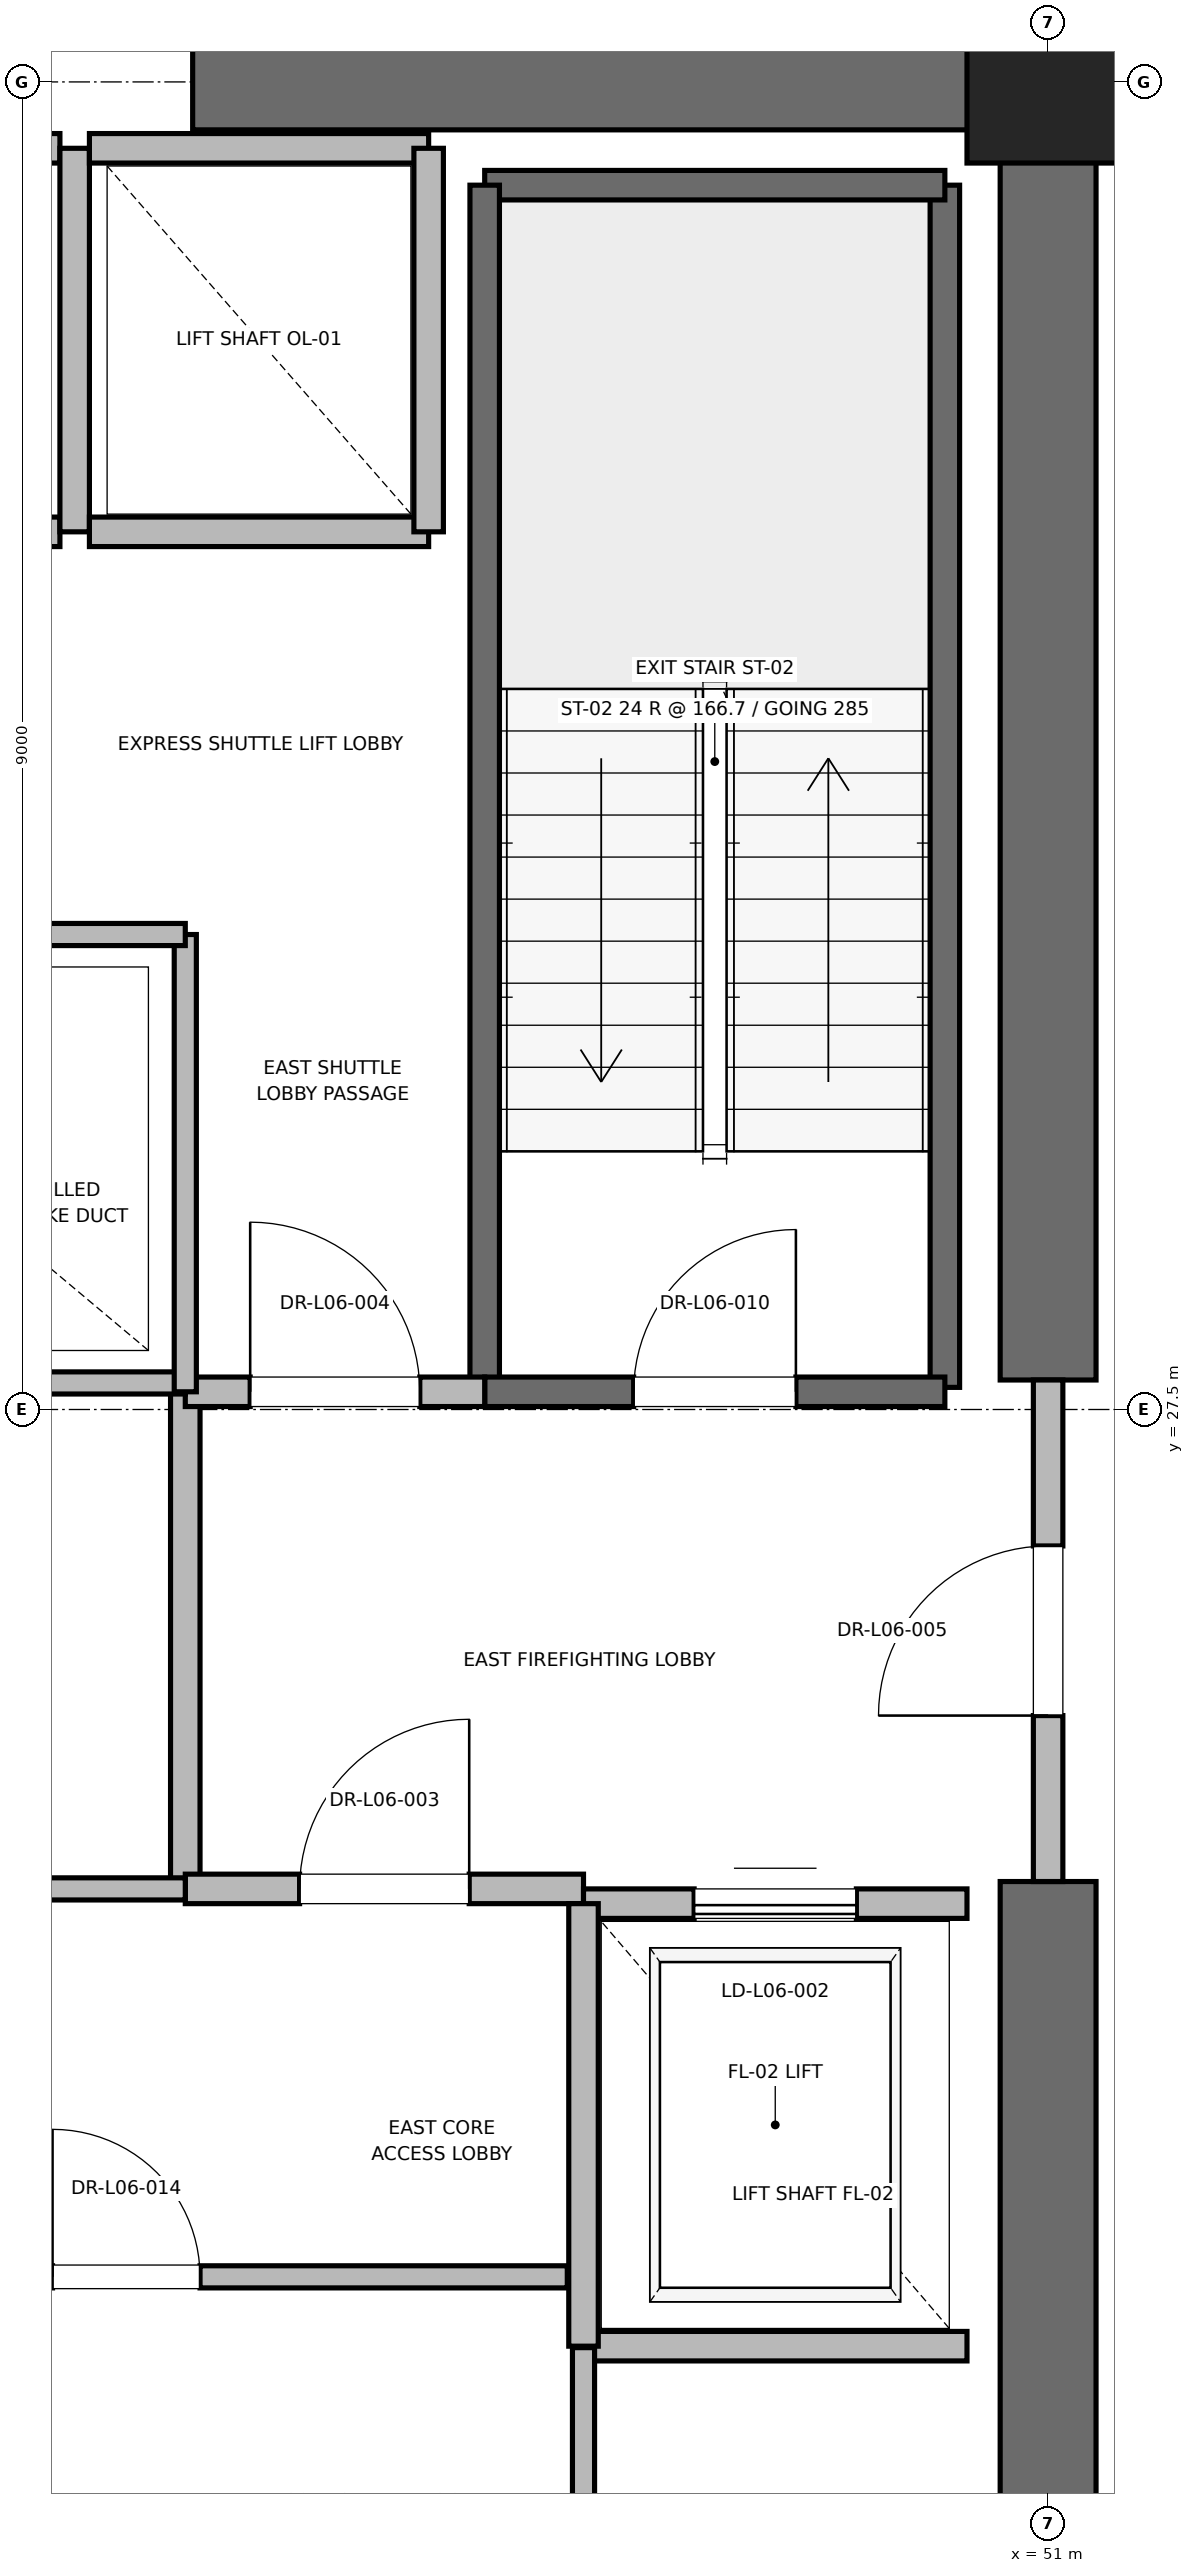
"""IFC4 building model, lengths in metres.
Left out: names, types, materials, properties, quantities, classifications, styles, units other than length and angle.
Written with IfcOpenShell. Run it as: python <this file> out.ifc"""

import sys

from ifc_helpers import new_model, si_unit, direction, frame, frame_2d, origin, origin_2d, place, context, subcontext, project, spatial, rectangle, extrude, element, fill, save


model = new_model("IFC4")
c1 = context("Model", 3, precision=1e-05, world=origin(), true_north=direction((0.0, 1.0)))
c2 = subcontext(c1, "Body", "Model", "MODEL_VIEW")
j1 = project(units=[si_unit("LENGTHUNIT", "METRE"), si_unit("PLANEANGLEUNIT", "RADIAN")], contexts=[c1])
p1 = place(None, origin())
s1 = spatial("IfcSite", under=j1, at=p1, CompositionType="ELEMENT")
p2 = place(p1, origin())
s2 = spatial("IfcBuilding", under=s1, at=p2, CompositionType="ELEMENT")
p3 = place(p2, frame((0.0, 0.0, 31.6)))
s3 = spatial("IfcBuildingStorey", under=s2, at=p3, CompositionType="ELEMENT", Elevation=31.6)
p4 = place(p3, frame((51.0, 36.5, 0.0), z_axis=(0.0, 0.0, 1.0), x_axis=(1.0, 0.0, 0.0)))
e1 = element("IfcColumn", 1, at=p4, inside=s3, PredefinedType="PILASTER", context=c2, shape_type="SweptSolid", body=[
    extrude(rectangle(XDim=1.1, YDim=1.1, at=origin_2d()), origin(), (0.0, 0.0, 1.0), 4.0),
])
for number, where, z_axis, x_axis in (
    (2, (45.2, 36.5, 0.0), (0.0, 0.0, 1.0), (1.0, 0.0, 0.0)),
    (3, (51.0, 18.5, 0.0), (0.0, 0.0, 1.0), (0.0, 1.0, 0.0)),
):
    element("IfcWall", number, at=place(p3, frame(where, z_axis=z_axis, x_axis=x_axis)), inside=s3, PredefinedType="SHEAR", context=c2, shape_type="SweptSolid", body=[
        extrude(rectangle(XDim=5.8, YDim=0.65, at=frame_2d((2.9, 0.0))), origin(), (0.0, 0.0, 1.0), 3.76),
    ])
p5 = place(p3, frame((51.0, 27.7, 0.0), z_axis=(0.0, 0.0, 1.0), x_axis=(0.0, 1.0, 0.0)))
e4 = element("IfcWall", 4, at=p5, inside=s3, PredefinedType="SHEAR", context=c2, shape_type="SweptSolid", body=[
    extrude(rectangle(XDim=8.8, YDim=0.65, at=frame_2d((4.4, 0.0))), origin(), (0.0, 0.0, 1.0), 3.76),
])
p6 = place(p3, frame((50.3, 27.65, 0.0), z_axis=(0.0, 0.0, 1.0), x_axis=(0.0, 1.0, 0.0)))
e5 = element("IfcWall", 5, at=p6, inside=s3, PredefinedType="SOLIDWALL", context=c2, shape_type="SweptSolid", body=[
    extrude(rectangle(XDim=8.15, YDim=0.2, at=frame_2d((4.075, 0.0))), origin(), (0.0, 0.0, 1.0), 3.76),
])
p7 = place(p3, frame((47.18, 35.8, 0.0), z_axis=(0.0, 0.0, 1.0), x_axis=(1.0, 0.0, 0.0)))
e6 = element("IfcWall", 6, at=p7, inside=s3, PredefinedType="SOLIDWALL", context=c2, shape_type="SweptSolid", body=[
    extrude(rectangle(XDim=3.12, YDim=0.2, at=frame_2d((1.56, 0.0))), origin(), (0.0, 0.0, 1.0), 3.76),
])
p8 = place(p3, frame((47.18, 27.62, 0.0), z_axis=(0.0, 0.0, 1.0), x_axis=(0.0, 1.0, 0.0)))
e7 = element("IfcWall", 7, at=p8, inside=s3, PredefinedType="SOLIDWALL", context=c2, shape_type="SweptSolid", body=[
    extrude(rectangle(XDim=8.18, YDim=0.2, at=frame_2d((4.09, 0.0))), origin(), (0.0, 0.0, 1.0), 3.76),
])
p9 = place(p3, frame((47.18, 27.62, 0.0), z_axis=(0.0, 0.0, 1.0), x_axis=(1.0, 0.0, 0.0)))
e8 = element("IfcWall", 8, at=p9, inside=s3, PredefinedType="SOLIDWALL", context=c2, shape_type="SweptSolid", body=[
    extrude(rectangle(XDim=3.12, YDim=0.2, at=frame_2d((1.56, 0.0))), origin(), (0.0, 0.0, 1.0), 3.76),
])
p10 = place(p9, frame((1.01, 0.0, 0.0)))
e9 = element("IfcOpeningElement", 9, at=p10, cuts=e8, PredefinedType="OPENING", context=c2, shape_type="SweptSolid", body=[
    extrude(rectangle(XDim=1.1, YDim=2.15, at=frame_2d((0.55, 1.075))), frame((0.0, 0.1, 0.0), z_axis=(0.0, -1.0, 0.0), x_axis=(1.0, 0.0, 0.0)), (0.0, 0.0, 1.0), 0.2),
])
p11 = place(p3, frame((45.15, 24.25, 0.0), z_axis=(0.0, 0.0, 1.0), x_axis=(0.0, 1.0, 0.0)))
e10 = element("IfcWall", 10, at=p11, inside=s3, PredefinedType="PARTITIONING", context=c2, shape_type="SweptSolid", body=[
    extrude(rectangle(XDim=3.37, YDim=0.2, at=frame_2d((1.685, 0.0))), origin(), (0.0, 0.0, 1.0), 3.76),
])
p12 = place(p3, frame((45.15, 24.25, 0.0), z_axis=(0.0, 0.0, 1.0), x_axis=(1.0, 0.0, 0.0)))
e11 = element("IfcWall", 11, at=p12, inside=s3, PredefinedType="PARTITIONING", context=c2, shape_type="SweptSolid", body=[
    extrude(rectangle(XDim=2.7, YDim=0.2, at=frame_2d((1.35, 0.0))), origin(), (0.0, 0.0, 1.0), 3.76),
])
p13 = place(p12, frame((0.775, 0.0, 0.0)))
e12 = element("IfcOpeningElement", 12, at=p13, cuts=e11, PredefinedType="OPENING", context=c2, shape_type="SweptSolid", body=[
    extrude(rectangle(XDim=1.15, YDim=2.2, at=frame_2d((0.575, 1.1))), frame((0.0, 0.1, 0.0), z_axis=(0.0, -1.0, 0.0), x_axis=(1.0, 0.0, 0.0)), (0.0, 0.0, 1.0), 0.2),
])
p14 = place(p3, frame((45.15, 27.62, 0.0), z_axis=(0.0, 0.0, 1.0), x_axis=(1.0, 0.0, 0.0)))
e13 = element("IfcWall", 13, at=p14, inside=s3, PredefinedType="PARTITIONING", context=c2, shape_type="SweptSolid", body=[
    extrude(rectangle(XDim=2.03, YDim=0.2, at=frame_2d((1.015, 0.0))), origin(), (0.0, 0.0, 1.0), 3.76),
])
p15 = place(p14, frame((0.44, 0.0, 0.0)))
e14 = element("IfcOpeningElement", 14, at=p15, cuts=e13, PredefinedType="OPENING", context=c2, shape_type="SweptSolid", body=[
    extrude(rectangle(XDim=1.15, YDim=2.2, at=frame_2d((0.575, 1.1))), frame((0.0, 0.1, 0.0), z_axis=(0.0, -1.0, 0.0), x_axis=(1.0, 0.0, 0.0)), (0.0, 0.0, 1.0), 0.2),
])
p16 = place(p3, frame((51.0, 24.3, 0.0), z_axis=(0.0, 0.0, 1.0), x_axis=(0.0, 1.0, 0.0)))
e15 = element("IfcWall", 15, at=p16, inside=s3, PredefinedType="PARTITIONING", context=c2, shape_type="SweptSolid", body=[
    extrude(rectangle(XDim=3.4, YDim=0.2, at=frame_2d((1.7, 0.0))), origin(), (0.0, 0.0, 1.0), 2.54),
])
p17 = place(p16, frame((1.125, 0.0, 0.0)))
e16 = element("IfcOpeningElement", 16, at=p17, cuts=e15, PredefinedType="OPENING", context=c2, shape_type="SweptSolid", body=[
    extrude(rectangle(XDim=1.15, YDim=2.2, at=frame_2d((0.575, 1.1))), frame((0.0, 0.1, 0.0), z_axis=(0.0, -1.0, 0.0), x_axis=(1.0, 0.0, 0.0)), (0.0, 0.0, 1.0), 0.2),
])
p18 = place(p3, frame((47.85, 21.15, 0.0), z_axis=(0.0, 0.0, 1.0), x_axis=(1.0, 0.0, 0.0)))
e17 = element("IfcWall", 17, at=p18, inside=s3, PredefinedType="SOLIDWALL", context=c2, shape_type="SweptSolid", body=[
    extrude(rectangle(XDim=2.6, YDim=0.2, at=frame_2d((1.3, 0.0))), origin(), (0.0, 0.0, 1.0), 3.76),
])
p19 = place(p3, frame((50.45, 24.15, 0.0), z_axis=(0.0, 0.0, 1.0), x_axis=(-1.0, 0.0, 0.0)))
e18 = element("IfcWall", 18, at=p19, inside=s3, PredefinedType="SOLIDWALL", context=c2, shape_type="SweptSolid", body=[
    extrude(rectangle(XDim=2.6, YDim=0.2, at=frame_2d((1.3, 0.0))), origin(), (0.0, 0.0, 1.0), 2.54),
])
p20 = place(p19, frame((0.75, 0.0, 0.0)))
e19 = element("IfcOpeningElement", 19, at=p20, cuts=e18, PredefinedType="OPENING", context=c2, shape_type="SweptSolid", body=[
    extrude(rectangle(XDim=1.1, YDim=2.2, at=frame_2d((0.55, 1.1))), frame((0.0, 0.1, 0.0), z_axis=(0.0, -1.0, 0.0), x_axis=(1.0, 0.0, 0.0)), (0.0, 0.0, 1.0), 0.2),
])
p21 = place(p3, frame((47.85, 24.15, 0.0), z_axis=(0.0, 0.0, 1.0), x_axis=(0.0, -1.0, 0.0)))
e20 = element("IfcWall", 20, at=p21, inside=s3, PredefinedType="SOLIDWALL", context=c2, shape_type="SweptSolid", body=[
    extrude(rectangle(XDim=3.0, YDim=0.2, at=frame_2d((1.5, 0.0))), origin(), (0.0, 0.0, 1.0), 3.76),
])
p22 = place(p3, frame((42.0, 33.45, 0.0), z_axis=(0.0, 0.0, 1.0), x_axis=(1.0, 0.0, 0.0)))
e21 = element("IfcWall", 21, at=p22, inside=s3, PredefinedType="SOLIDWALL", context=c2, shape_type="SweptSolid", body=[
    extrude(rectangle(XDim=2.3, YDim=0.2, at=frame_2d((1.15, 0.0))), origin(), (0.0, 0.0, 1.0), 3.76),
])
p23 = place(p3, frame((44.3, 36.05, 0.0), z_axis=(0.0, 0.0, 1.0), x_axis=(-1.0, 0.0, 0.0)))
e22 = element("IfcWall", 22, at=p23, inside=s3, PredefinedType="SOLIDWALL", context=c2, shape_type="SweptSolid", body=[
    extrude(rectangle(XDim=2.3, YDim=0.2, at=frame_2d((1.15, 0.0))), origin(), (0.0, 0.0, 1.0), 2.54),
])
p24 = place(p3, frame((44.4, 33.45, 0.0), z_axis=(0.0, 0.0, 1.0), x_axis=(0.0, 1.0, 0.0)))
e23 = element("IfcWall", 23, at=p24, inside=s3, PredefinedType="SOLIDWALL", context=c2, shape_type="SweptSolid", body=[
    extrude(rectangle(XDim=2.6, YDim=0.2, at=frame_2d((1.3, 0.0))), origin(), (0.0, 0.0, 1.0), 2.54),
])
p25 = place(p3, frame((44.5, 33.45, 0.0), z_axis=(0.0, 0.0, 1.0), x_axis=(1.0, 0.0, 0.0)))
e24 = element("IfcWall", 24, at=p25, inside=s3, PredefinedType="SOLIDWALL", context=c2, shape_type="SweptSolid", body=[
    extrude(rectangle(XDim=2.3, YDim=0.2, at=frame_2d((1.15, 0.0))), origin(), (0.0, 0.0, 1.0), 3.76),
])
p26 = place(p3, frame((46.8, 36.05, 0.0), z_axis=(0.0, 0.0, 1.0), x_axis=(-1.0, 0.0, 0.0)))
e25 = element("IfcWall", 25, at=p26, inside=s3, PredefinedType="SOLIDWALL", context=c2, shape_type="SweptSolid", body=[
    extrude(rectangle(XDim=2.3, YDim=0.2, at=frame_2d((1.15, 0.0))), origin(), (0.0, 0.0, 1.0), 2.54),
])
p27 = place(p3, frame((46.8, 33.45, 0.0), z_axis=(0.0, 0.0, 1.0), x_axis=(0.0, 1.0, 0.0)))
e26 = element("IfcWall", 26, at=p27, inside=s3, PredefinedType="SOLIDWALL", context=c2, shape_type="SweptSolid", body=[
    extrude(rectangle(XDim=2.6, YDim=0.2, at=frame_2d((1.3, 0.0))), origin(), (0.0, 0.0, 1.0), 3.76),
])
p28 = place(p3, frame((41.56, 27.68, 0.0), z_axis=(0.0, 0.0, 1.0), x_axis=(1.0, 0.0, 0.0)))
e27 = element("IfcWall", 27, at=p28, inside=s3, PredefinedType="PARTITIONING", context=c2, shape_type="SweptSolid", body=[
    extrude(rectangle(XDim=3.59, YDim=0.15, at=frame_2d((1.795, 0.0))), origin(), (0.0, 0.0, 1.0), 2.85),
])
p29 = place(p3, frame((47.85, 18.6, 0.0), z_axis=(0.0, 0.0, 1.0), x_axis=(0.0, 1.0, 0.0)))
e28 = element("IfcWall", 28, at=p29, inside=s3, PredefinedType="PARTITIONING", context=c2, shape_type="SweptSolid", body=[
    extrude(rectangle(XDim=2.54, YDim=0.15, at=frame_2d((1.27, 0.0))), origin(), (0.0, 0.0, 1.0), 2.85),
])
p30 = place(p3, frame((41.76, 21.62, 0.0), z_axis=(0.0, 0.0, 1.0), x_axis=(1.0, 0.0, 0.0)))
e29 = element("IfcWall", 29, at=p30, inside=s3, PredefinedType="PARTITIONING", context=c2, shape_type="SweptSolid", body=[
    extrude(rectangle(XDim=5.98, YDim=0.15, at=frame_2d((2.99, 0.0))), origin(), (0.0, 0.0, 1.0), 2.85),
])
p31 = place(p30, frame((2.49, 0.0, 0.0)))
e30 = element("IfcOpeningElement", 30, at=p31, cuts=e29, PredefinedType="OPENING", context=c2, shape_type="SweptSolid", body=[
    extrude(rectangle(XDim=1.0, YDim=2.15, at=frame_2d((0.5, 1.075))), frame((0.0, 0.075, 0.0), z_axis=(0.0, -1.0, 0.0), x_axis=(1.0, 0.0, 0.0)), (0.0, 0.0, 1.0), 0.15),
])
p32 = place(p3, frame((41.76, 24.25, 0.0), z_axis=(0.0, 0.0, 1.0), x_axis=(1.0, 0.0, 0.0)))
e31 = element("IfcWall", 31, at=p32, inside=s3, PredefinedType="PARTITIONING", context=c2, shape_type="SweptSolid", body=[
    extrude(rectangle(XDim=3.39, YDim=0.15, at=frame_2d((1.695, 0.0))), origin(), (0.0, 0.0, 1.0), 2.85),
])
p33 = place(p32, frame((1.195, 0.0, 0.0)))
e32 = element("IfcOpeningElement", 32, at=p33, cuts=e31, PredefinedType="OPENING", context=c2, shape_type="SweptSolid", body=[
    extrude(rectangle(XDim=1.0, YDim=2.15, at=frame_2d((0.5, 1.075))), frame((0.0, 0.075, 0.0), z_axis=(0.0, -1.0, 0.0), x_axis=(1.0, 0.0, 0.0)), (0.0, 0.0, 1.0), 0.15),
])
p34 = place(p3, frame((45.15, 27.62, 0.0), z_axis=(0.0, 0.0, 1.0), x_axis=(0.0, 1.0, 0.0)))
e33 = element("IfcWall", 33, at=p34, inside=s3, PredefinedType="PARTITIONING", context=c2, shape_type="SweptSolid", body=[
    extrude(rectangle(XDim=3.1, YDim=0.15, at=frame_2d((1.55, 0.0))), origin(), (0.0, 0.0, 1.0), 2.85),
])
p35 = place(p3, frame((41.56, 30.72, 0.0), z_axis=(0.0, 0.0, 1.0), x_axis=(1.0, 0.0, 0.0)))
e34 = element("IfcWall", 34, at=p35, inside=s3, PredefinedType="PARTITIONING", context=c2, shape_type="SweptSolid", body=[
    extrude(rectangle(XDim=3.59, YDim=0.15, at=frame_2d((1.795, 0.0))), origin(), (0.0, 0.0, 1.0), 2.85),
])
p36 = place(p35, frame((1.355, 0.0, 0.0)))
e35 = element("IfcOpeningElement", 35, at=p36, cuts=e34, PredefinedType="OPENING", context=c2, shape_type="SweptSolid", body=[
    extrude(rectangle(XDim=0.88, YDim=2.1, at=frame_2d((0.44, 1.05))), frame((0.0, 0.075, 0.0), z_axis=(0.0, -1.0, 0.0), x_axis=(1.0, 0.0, 0.0)), (0.0, 0.0, 1.0), 0.15),
])
p37 = place(p10, origin())
e36 = element("IfcDoor", 36, at=p37, inside=s3, OperationType="SINGLE_SWING_RIGHT", PredefinedType="DOOR", context=c2, shape_type="SweptSolid", body=[
    extrude(rectangle(XDim=1.1, YDim=2.15, at=frame_2d((0.55, 1.075))), frame((0.0, 0.025, 0.0), z_axis=(0.0, -1.0, 0.0), x_axis=(1.0, 0.0, 0.0)), (0.0, 0.0, 1.0), 0.05),
])
fill(e9, e36)
p38 = place(p13, origin())
e37 = element("IfcDoor", 37, at=p38, inside=s3, OperationType="SINGLE_SWING_RIGHT", PredefinedType="DOOR", context=c2, shape_type="SweptSolid", body=[
    extrude(rectangle(XDim=1.15, YDim=2.2, at=frame_2d((0.575, 1.1))), frame((0.0, 0.025, 0.0), z_axis=(0.0, -1.0, 0.0), x_axis=(1.0, 0.0, 0.0)), (0.0, 0.0, 1.0), 0.05),
])
fill(e12, e37)
p39 = place(p15, origin())
e38 = element("IfcDoor", 38, at=p39, inside=s3, OperationType="SINGLE_SWING_LEFT", PredefinedType="DOOR", context=c2, shape_type="SweptSolid", body=[
    extrude(rectangle(XDim=1.15, YDim=2.2, at=frame_2d((0.575, 1.1))), frame((0.0, 0.025, 0.0), z_axis=(0.0, -1.0, 0.0), x_axis=(1.0, 0.0, 0.0)), (0.0, 0.0, 1.0), 0.05),
])
fill(e14, e38)
p40 = place(p17, origin())
e39 = element("IfcDoor", 39, at=p40, inside=s3, OperationType="SINGLE_SWING_LEFT", PredefinedType="DOOR", context=c2, shape_type="SweptSolid", body=[
    extrude(rectangle(XDim=1.15, YDim=2.2, at=frame_2d((0.575, 1.1))), frame((0.0, 0.025, 0.0), z_axis=(0.0, -1.0, 0.0), x_axis=(1.0, 0.0, 0.0)), (0.0, 0.0, 1.0), 0.05),
])
fill(e16, e39)
p41 = place(p20, origin())
e40 = element("IfcDoor", 40, at=p41, inside=s3, OperationType="SLIDING_TO_RIGHT", PredefinedType="DOOR", context=c2, shape_type="SweptSolid", body=[
    extrude(rectangle(XDim=1.1, YDim=2.2, at=frame_2d((0.55, 1.1))), frame((0.0, 0.025, 0.0), z_axis=(0.0, -1.0, 0.0), x_axis=(1.0, 0.0, 0.0)), (0.0, 0.0, 1.0), 0.05),
])
fill(e19, e40)
p42 = place(p31, origin())
e41 = element("IfcDoor", 41, at=p42, inside=s3, OperationType="SINGLE_SWING_LEFT", PredefinedType="DOOR", context=c2, shape_type="SweptSolid", body=[
    extrude(rectangle(XDim=1.0, YDim=2.15, at=frame_2d((0.5, 1.075))), frame((0.0, 0.025, 0.0), z_axis=(0.0, -1.0, 0.0), x_axis=(1.0, 0.0, 0.0)), (0.0, 0.0, 1.0), 0.05),
])
fill(e30, e41)
save(model, sys.argv[1])
